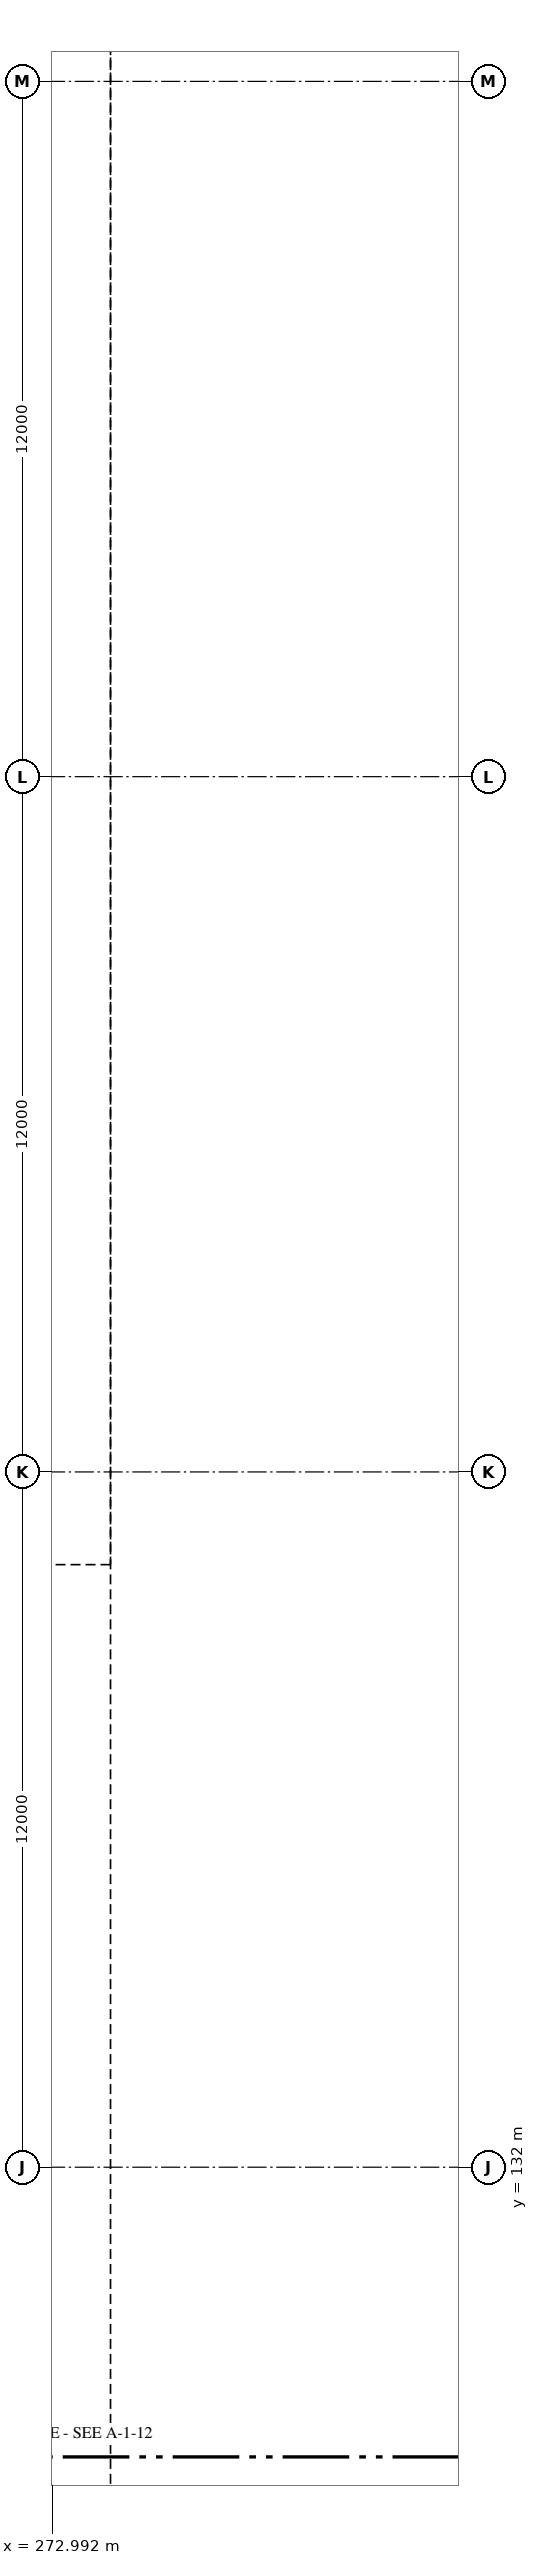
"""IFC4 building model, lengths in metres.
Left out: names, types, materials, properties, quantities, classifications, styles, units other than length and angle.
Written with IfcOpenShell. Run it as: python <this file> out.ifc"""

import sys

from ifc_helpers import new_model, si_unit, direction, frame, frame_2d, origin, place, context, subcontext, project, spatial, rectangle, extrude, element, save


model = new_model("IFC4")
c1 = context("Model", 3, precision=1e-05, world=origin(), true_north=direction((0.0, 1.0)))
c2 = subcontext(c1, "Body", "Model", "MODEL_VIEW")
j1 = project(units=[si_unit("LENGTHUNIT", "METRE"), si_unit("PLANEANGLEUNIT", "RADIAN")], contexts=[c1])
p1 = place(None, origin())
s1 = spatial("IfcSite", under=j1, at=p1, CompositionType="ELEMENT")
p2 = place(p1, origin())
s2 = spatial("IfcBuilding", under=s1, at=p2, CompositionType="ELEMENT")
p3 = place(p2, origin())
s3 = spatial("IfcBuildingStorey", under=s2, at=p3, CompositionType="ELEMENT", Elevation=0.0)
p4 = place(p3, frame((229.649, 155.991, -0.3), z_axis=(0.0, 0.0, 1.0), x_axis=(0.809016008294, 0.587786609514, 0.0)))
e1 = element("IfcWall", 1, at=p4, inside=s3, PredefinedType="SOLIDWALL", context=c2, shape_type="SweptSolid", body=[
    extrude(rectangle(XDim=60.4, YDim=0.5, at=frame_2d((30.2, 0.0))), origin(), (0.0, 0.0, 1.0), 7.5),
])
p5 = place(p4, frame((41.2, 0.0, 0.3)))
e2 = element("IfcOpeningElement", 2, at=p5, cuts=e1, PredefinedType="OPENING", context=c2, shape_type="SweptSolid", body=[
    extrude(rectangle(XDim=2.4, YDim=2.4, at=frame_2d((1.2, 1.2))), frame((0.0, 0.26, 0.0), z_axis=(0.0, -1.0, 0.0), x_axis=(1.0, 0.0, 0.0)), (0.0, 0.0, 1.0), 0.52),
])
p6 = place(p4, frame((33.2, 0.0, 0.3)))
e3 = element("IfcOpeningElement", 3, at=p6, cuts=e1, PredefinedType="OPENING", context=c2, shape_type="SweptSolid", body=[
    extrude(rectangle(XDim=2.4, YDim=2.4, at=frame_2d((1.2, 1.2))), frame((0.0, 0.26, 0.0), z_axis=(0.0, -1.0, 0.0), x_axis=(1.0, 0.0, 0.0)), (0.0, 0.0, 1.0), 0.52),
])
p7 = place(p4, frame((0.5, 0.0, 0.3)))
e4 = element("IfcOpeningElement", 4, at=p7, cuts=e1, PredefinedType="OPENING", context=c2, shape_type="SweptSolid", body=[
    extrude(rectangle(XDim=2.1, YDim=2.1, at=frame_2d((1.05, 1.05))), frame((0.0, 0.26, 0.0), z_axis=(0.0, -1.0, 0.0), x_axis=(1.0, 0.0, 0.0)), (0.0, 0.0, 1.0), 0.52),
])
p8 = place(p4, frame((15.6, 0.0, 0.3)))
e5 = element("IfcOpeningElement", 5, at=p8, cuts=e1, PredefinedType="OPENING", context=c2, shape_type="SweptSolid", body=[
    extrude(rectangle(XDim=2.1, YDim=2.1, at=frame_2d((1.05, 1.05))), frame((0.0, 0.26, 0.0), z_axis=(0.0, -1.0, 0.0), x_axis=(1.0, 0.0, 0.0)), (0.0, 0.0, 1.0), 0.52),
])
p9 = place(p4, frame((50.75, 0.0, 2.4)))
e6 = element("IfcOpeningElement", 6, at=p9, cuts=e1, PredefinedType="OPENING", context=c2, shape_type="SweptSolid", body=[
    extrude(rectangle(XDim=1.2, YDim=1.2, at=frame_2d((0.6, 0.6))), frame((0.0, 0.26, 0.0), z_axis=(0.0, -1.0, 0.0), x_axis=(1.0, 0.0, 0.0)), (0.0, 0.0, 1.0), 0.52),
])
p10 = place(p4, frame((53.45, 0.0, 2.4)))
e7 = element("IfcOpeningElement", 7, at=p10, cuts=e1, PredefinedType="OPENING", context=c2, shape_type="SweptSolid", body=[
    extrude(rectangle(XDim=1.5, YDim=1.2, at=frame_2d((0.75, 0.6))), frame((0.0, 0.26, 0.0), z_axis=(0.0, -1.0, 0.0), x_axis=(1.0, 0.0, 0.0)), (0.0, 0.0, 1.0), 0.52),
])
p11 = place(p4, frame((57.35, 0.0, 2.4)))
e8 = element("IfcOpeningElement", 8, at=p11, cuts=e1, PredefinedType="OPENING", context=c2, shape_type="SweptSolid", body=[
    extrude(rectangle(XDim=1.5, YDim=1.2, at=frame_2d((0.75, 0.6))), frame((0.0, 0.26, 0.0), z_axis=(0.0, -1.0, 0.0), x_axis=(1.0, 0.0, 0.0)), (0.0, 0.0, 1.0), 0.52),
])
save(model, sys.argv[1])
